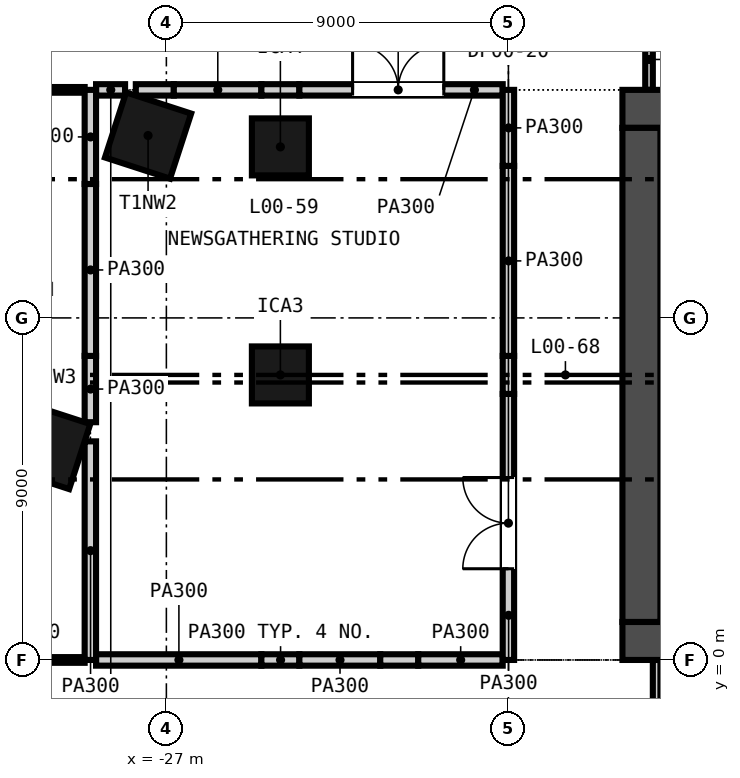
"""IFC4 building model, lengths in metres.
Left out: names, types, materials, properties, quantities, classifications, styles, units other than length and angle.
Written with IfcOpenShell. Run it as: python <this file> out.ifc"""

import sys

from ifc_helpers import new_model, si_unit, direction, frame, frame_2d, origin, origin_2d, place, context, subcontext, project, spatial, rectangle, extrude, element, fill, save


model = new_model("IFC4")
c1 = context("Model", 3, precision=1e-05, world=origin(), true_north=direction((0.0, 1.0)))
c2 = subcontext(c1, "Body", "Model", "MODEL_VIEW")
j1 = project(units=[si_unit("LENGTHUNIT", "METRE"), si_unit("PLANEANGLEUNIT", "RADIAN")], contexts=[c1])
p1 = place(None, origin())
s1 = spatial("IfcSite", under=j1, at=p1, CompositionType="ELEMENT")
p2 = place(p1, origin())
s2 = spatial("IfcBuilding", under=s1, at=p2, CompositionType="ELEMENT")
p3 = place(p2, origin())
s3 = spatial("IfcBuildingStorey", under=s2, at=p3, CompositionType="ELEMENT", Elevation=0.0)
p4 = place(p3, frame((-15.0, 0.5, -2.2), z_axis=(0.0, 0.0, 1.0), x_axis=(1.0, 0.0, 0.0)))
e1 = element("IfcWall", 1, at=p4, inside=s3, PredefinedType="SOLIDWALL", context=c2, shape_type="SweptSolid", body=[
    extrude(rectangle(XDim=30.0, YDim=1.0, at=frame_2d((15.0, 0.0))), origin(), (0.0, 0.0, 1.0), 10.8),
])
p5 = place(p4, frame((5.8, 0.0, 2.2)))
e2 = element("IfcOpeningElement", 2, at=p5, cuts=e1, PredefinedType="OPENING", context=c2, shape_type="SweptSolid", body=[
    extrude(rectangle(XDim=2.4, YDim=2.4, at=frame_2d((1.2, 1.2))), frame((0.0, 0.51, 0.0), z_axis=(0.0, -1.0, 0.0), x_axis=(1.0, 0.0, 0.0)), (0.0, 0.0, 1.0), 1.02),
])
p6 = place(p4, frame((13.8, 0.0, 2.2)))
e3 = element("IfcOpeningElement", 3, at=p6, cuts=e1, PredefinedType="OPENING", context=c2, shape_type="SweptSolid", body=[
    extrude(rectangle(XDim=2.4, YDim=2.4, at=frame_2d((1.2, 1.2))), frame((0.0, 0.51, 0.0), z_axis=(0.0, -1.0, 0.0), x_axis=(1.0, 0.0, 0.0)), (0.0, 0.0, 1.0), 1.02),
])
p7 = place(p4, frame((21.8, 0.0, 2.2)))
e4 = element("IfcOpeningElement", 4, at=p7, cuts=e1, PredefinedType="OPENING", context=c2, shape_type="SweptSolid", body=[
    extrude(rectangle(XDim=2.4, YDim=2.4, at=frame_2d((1.2, 1.2))), frame((0.0, 0.51, 0.0), z_axis=(0.0, -1.0, 0.0), x_axis=(1.0, 0.0, 0.0)), (0.0, 0.0, 1.0), 1.02),
])
p8 = place(p4, frame((1.5, 0.0, 2.2)))
e5 = element("IfcOpeningElement", 5, at=p8, cuts=e1, PredefinedType="OPENING", context=c2, shape_type="SweptSolid", body=[
    extrude(rectangle(XDim=1.2, YDim=2.1, at=frame_2d((0.6, 1.05))), frame((0.0, 0.51, 0.0), z_axis=(0.0, -1.0, 0.0), x_axis=(1.0, 0.0, 0.0)), (0.0, 0.0, 1.0), 1.02),
])
p9 = place(p4, frame((27.3, 0.0, 2.2)))
e6 = element("IfcOpeningElement", 6, at=p9, cuts=e1, PredefinedType="OPENING", context=c2, shape_type="SweptSolid", body=[
    extrude(rectangle(XDim=1.2, YDim=2.1, at=frame_2d((0.6, 1.05))), frame((0.0, 0.51, 0.0), z_axis=(0.0, -1.0, 0.0), x_axis=(1.0, 0.0, 0.0)), (0.0, 0.0, 1.0), 1.02),
])
p10 = place(p3, frame((-15.0, 14.5, -2.2), z_axis=(0.0, 0.0, 1.0), x_axis=(1.0, 0.0, 0.0)))
e7 = element("IfcWall", 7, at=p10, inside=s3, PredefinedType="SOLIDWALL", context=c2, shape_type="SweptSolid", body=[
    extrude(rectangle(XDim=30.0, YDim=1.0, at=frame_2d((15.0, 0.0))), origin(), (0.0, 0.0, 1.0), 10.8),
])
p11 = place(p10, frame((9.25, 0.0, 2.2)))
e8 = element("IfcOpeningElement", 8, at=p11, cuts=e7, PredefinedType="OPENING", context=c2, shape_type="SweptSolid", body=[
    extrude(rectangle(XDim=1.5, YDim=2.1, at=frame_2d((0.75, 1.05))), frame((0.0, 0.51, 0.0), z_axis=(0.0, -1.0, 0.0), x_axis=(1.0, 0.0, 0.0)), (0.0, 0.0, 1.0), 1.02),
])
p12 = place(p10, frame((19.4, 0.0, 2.2)))
e9 = element("IfcOpeningElement", 9, at=p12, cuts=e7, PredefinedType="OPENING", context=c2, shape_type="SweptSolid", body=[
    extrude(rectangle(XDim=1.5, YDim=2.1, at=frame_2d((0.75, 1.05))), frame((0.0, 0.51, 0.0), z_axis=(0.0, -1.0, 0.0), x_axis=(1.0, 0.0, 0.0)), (0.0, 0.0, 1.0), 1.02),
])
p13 = place(p10, frame((1.5, 0.0, 2.2)))
e10 = element("IfcOpeningElement", 10, at=p13, cuts=e7, PredefinedType="OPENING", context=c2, shape_type="SweptSolid", body=[
    extrude(rectangle(XDim=1.2, YDim=2.1, at=frame_2d((0.6, 1.05))), frame((0.0, 0.51, 0.0), z_axis=(0.0, -1.0, 0.0), x_axis=(1.0, 0.0, 0.0)), (0.0, 0.0, 1.0), 1.02),
])
p14 = place(p10, frame((27.3, 0.0, 2.2)))
e11 = element("IfcOpeningElement", 11, at=p14, cuts=e7, PredefinedType="OPENING", context=c2, shape_type="SweptSolid", body=[
    extrude(rectangle(XDim=1.2, YDim=2.1, at=frame_2d((0.6, 1.05))), frame((0.0, 0.51, 0.0), z_axis=(0.0, -1.0, 0.0), x_axis=(1.0, 0.0, 0.0)), (0.0, 0.0, 1.0), 1.02),
])
p15 = place(p3, frame((-14.5, 1.0, -2.2), z_axis=(0.0, 0.0, 1.0), x_axis=(0.0, 1.0, 0.0)))
e12 = element("IfcWall", 12, at=p15, inside=s3, PredefinedType="SOLIDWALL", context=c2, shape_type="SweptSolid", body=[
    extrude(rectangle(XDim=13.0, YDim=1.0, at=frame_2d((6.5, 0.0))), origin(), (0.0, 0.0, 1.0), 10.8),
])
for number, where, z_axis, x_axis in (
    (13, (-27.482, 13.799, -0.3), (0.0, 0.0, 1.0), (-0.309, -0.951, 0.0)),
    (14, (-30.136, 5.63, -0.3), (0.0, 0.0, 1.0), (-0.309, -0.951, 0.0)),
):
    element("IfcColumn", number, at=place(p3, frame(where, z_axis=z_axis, x_axis=x_axis)), inside=s3, PredefinedType="COLUMN", context=c2, shape_type="SweptSolid", body=[
        extrude(rectangle(XDim=1.8, YDim=1.8, at=origin_2d()), origin(), (0.0, 0.0, 1.0), 8.9),
    ])
for number, where, z_axis, x_axis in (
    (15, (-24.0, 7.5, -0.3), (0.0, 0.0, 1.0), (1.0, 0.0, 0.0)),
    (16, (-24.0, 13.5, -0.3), (0.0, 0.0, 1.0), (1.0, 0.0, 0.0)),
):
    element("IfcColumn", number, at=place(p3, frame(where, z_axis=z_axis, x_axis=x_axis)), inside=s3, PredefinedType="COLUMN", context=c2, shape_type="SweptSolid", body=[
        extrude(rectangle(XDim=1.5, YDim=1.5, at=origin_2d()), origin(), (0.0, 0.0, 1.0), 8.9),
    ])
p16 = place(p3, frame((-31.991, 0.0, 0.0), z_axis=(0.0, 0.0, 1.0), x_axis=(1.0, 0.0, 0.0)))
e17 = element("IfcWall", 17, at=p16, inside=s3, PredefinedType="PARTITIONING", context=c2, shape_type="SweptSolid", body=[
    extrude(rectangle(XDim=2.841, YDim=0.15, at=frame_2d((1.42, 0.0))), origin(), (0.0, 0.0, 1.0), 8.6),
])
p17 = place(p3, frame((-28.85, 0.0, 0.0), z_axis=(0.0, 0.0, 1.0), x_axis=(1.0, 0.0, 0.0)))
e18 = element("IfcWall", 18, at=p17, inside=s3, PredefinedType="PARTITIONING", context=c2, shape_type="SweptSolid", body=[
    extrude(rectangle(XDim=4.35, YDim=0.3, at=frame_2d((2.175, 0.0))), origin(), (0.0, 0.0, 1.0), 8.6),
])
p18 = place(p3, frame((-24.5, 0.0, 0.0), z_axis=(0.0, 0.0, 1.0), x_axis=(1.0, 0.0, 0.0)))
e19 = element("IfcWall", 19, at=p18, inside=s3, PredefinedType="PARTITIONING", context=c2, shape_type="SweptSolid", body=[
    extrude(rectangle(XDim=1.0, YDim=0.3, at=frame_2d((0.5, 0.0))), origin(), (0.0, 0.0, 1.0), 7.765),
])
p19 = place(p3, frame((-23.5, 0.0, 0.0), z_axis=(0.0, 0.0, 1.0), x_axis=(1.0, 0.0, 0.0)))
e20 = element("IfcWall", 20, at=p19, inside=s3, PredefinedType="PARTITIONING", context=c2, shape_type="SweptSolid", body=[
    extrude(rectangle(XDim=2.128, YDim=0.3, at=frame_2d((1.064, 0.0))), origin(), (0.0, 0.0, 1.0), 8.6),
])
p20 = place(p3, frame((-21.372, 0.0, 0.0), z_axis=(0.0, 0.0, 1.0), x_axis=(1.0, 0.0, 0.0)))
e21 = element("IfcWall", 21, at=p20, inside=s3, PredefinedType="PARTITIONING", context=c2, shape_type="SweptSolid", body=[
    extrude(rectangle(XDim=1.0, YDim=0.3, at=frame_2d((0.5, 0.0))), origin(), (0.0, 0.0, 1.0), 7.765),
])
p21 = place(p3, frame((-20.372, 0.0, 0.0), z_axis=(0.0, 0.0, 1.0), x_axis=(1.0, 0.0, 0.0)))
e22 = element("IfcWall", 22, at=p21, inside=s3, PredefinedType="PARTITIONING", context=c2, shape_type="SweptSolid", body=[
    extrude(rectangle(XDim=2.222, YDim=0.3, at=frame_2d((1.111, 0.0))), origin(), (0.0, 0.0, 1.0), 8.6),
])
p22 = place(p3, frame((-36.25, 15.0, 0.0), z_axis=(0.0, 0.0, 1.0), x_axis=(1.0, 0.0, 0.0)))
e23 = element("IfcWall", 23, at=p22, inside=s3, PredefinedType="PARTITIONING", context=c2, shape_type="SweptSolid", body=[
    extrude(rectangle(XDim=7.1, YDim=0.15, at=frame_2d((3.55, 0.0))), origin(), (0.0, 0.0, 1.0), 8.6),
])
p23 = place(p22, frame((3.15, 0.0, 0.0)))
e24 = element("IfcOpeningElement", 24, at=p23, cuts=e23, PredefinedType="OPENING", context=c2, shape_type="SweptSolid", body=[
    extrude(rectangle(XDim=1.0, YDim=2.1, at=frame_2d((0.5, 1.05))), frame((0.0, 0.085, 0.0), z_axis=(0.0, -1.0, 0.0), x_axis=(1.0, 0.0, 0.0)), (0.0, 0.0, 1.0), 0.17),
])
p24 = place(p3, frame((-28.85, 15.0, 0.0), z_axis=(0.0, 0.0, 1.0), x_axis=(1.0, 0.0, 0.0)))
e25 = element("IfcWall", 25, at=p24, inside=s3, PredefinedType="PARTITIONING", context=c2, shape_type="SweptSolid", body=[
    extrude(rectangle(XDim=0.764, YDim=0.3, at=frame_2d((0.382, 0.0))), origin(), (0.0, 0.0, 1.0), 8.6),
])
p25 = place(p3, frame((-27.804, 15.0, 0.0), z_axis=(0.0, 0.0, 1.0), x_axis=(1.0, 0.0, 0.0)))
e26 = element("IfcWall", 26, at=p25, inside=s3, PredefinedType="PARTITIONING", context=c2, shape_type="SweptSolid", body=[
    extrude(rectangle(XDim=1.0, YDim=0.3, at=frame_2d((0.5, 0.0))), origin(), (0.0, 0.0, 1.0), 7.6),
])
p26 = place(p3, frame((-26.804, 15.0, 0.0), z_axis=(0.0, 0.0, 1.0), x_axis=(1.0, 0.0, 0.0)))
e27 = element("IfcWall", 27, at=p26, inside=s3, PredefinedType="PARTITIONING", context=c2, shape_type="SweptSolid", body=[
    extrude(rectangle(XDim=2.304, YDim=0.3, at=frame_2d((1.152, 0.0))), origin(), (0.0, 0.0, 1.0), 8.6),
])
p27 = place(p3, frame((-24.5, 15.0, 0.0), z_axis=(0.0, 0.0, 1.0), x_axis=(1.0, 0.0, 0.0)))
e28 = element("IfcWall", 28, at=p27, inside=s3, PredefinedType="PARTITIONING", context=c2, shape_type="SweptSolid", body=[
    extrude(rectangle(XDim=1.0, YDim=0.3, at=frame_2d((0.5, 0.0))), origin(), (0.0, 0.0, 1.0), 7.997),
])
p28 = place(p3, frame((-23.5, 15.0, 0.0), z_axis=(0.0, 0.0, 1.0), x_axis=(1.0, 0.0, 0.0)))
e29 = element("IfcWall", 29, at=p28, inside=s3, PredefinedType="PARTITIONING", context=c2, shape_type="SweptSolid", body=[
    extrude(rectangle(XDim=5.35, YDim=0.3, at=frame_2d((2.675, 0.0))), origin(), (0.0, 0.0, 1.0), 8.6),
])
p29 = place(p28, frame((1.4, 0.0, 0.0)))
e30 = element("IfcOpeningElement", 30, at=p29, cuts=e29, PredefinedType="OPENING", context=c2, shape_type="SweptSolid", body=[
    extrude(rectangle(XDim=2.4, YDim=2.4, at=frame_2d((1.2, 1.2))), frame((0.0, 0.16, 0.0), z_axis=(0.0, -1.0, 0.0), x_axis=(1.0, 0.0, 0.0)), (0.0, 0.0, 1.0), 0.32),
])
p30 = place(p3, frame((-29.0, 0.0, 0.0), z_axis=(0.0, 0.0, 1.0), x_axis=(0.0, 1.0, 0.0)))
e31 = element("IfcWall", 31, at=p30, inside=s3, PredefinedType="PARTITIONING", context=c2, shape_type="SweptSolid", body=[
    extrude(rectangle(XDim=5.752, YDim=0.3, at=frame_2d((2.876, 0.0))), origin(), (0.0, 0.0, 1.0), 8.6),
])
p31 = place(p3, frame((-29.0, 6.256, 0.0), z_axis=(0.0, 0.0, 1.0), x_axis=(0.0, 1.0, 0.0)))
e32 = element("IfcWall", 32, at=p31, inside=s3, PredefinedType="PARTITIONING", context=c2, shape_type="SweptSolid", body=[
    extrude(rectangle(XDim=1.744, YDim=0.3, at=frame_2d((0.872, 0.0))), origin(), (0.0, 0.0, 1.0), 8.067),
])
p32 = place(p3, frame((-29.0, 8.0, 0.0), z_axis=(0.0, 0.0, 1.0), x_axis=(0.0, 1.0, 0.0)))
e33 = element("IfcWall", 33, at=p32, inside=s3, PredefinedType="PARTITIONING", context=c2, shape_type="SweptSolid", body=[
    extrude(rectangle(XDim=4.524, YDim=0.3, at=frame_2d((2.262, 0.0))), origin(), (0.0, 0.0, 1.0), 7.6),
])
p33 = place(p3, frame((-29.0, 12.524, 0.0), z_axis=(0.0, 0.0, 1.0), x_axis=(0.0, 1.0, 0.0)))
e34 = element("IfcWall", 34, at=p33, inside=s3, PredefinedType="PARTITIONING", context=c2, shape_type="SweptSolid", body=[
    extrude(rectangle(XDim=2.476, YDim=0.3, at=frame_2d((1.238, 0.0))), origin(), (0.0, 0.0, 1.0), 8.6),
])
p34 = place(p3, frame((-18.0, 0.0, 0.0), z_axis=(0.0, 0.0, 1.0), x_axis=(0.0, 1.0, 0.0)))
e35 = element("IfcWall", 35, at=p34, inside=s3, PredefinedType="PARTITIONING", context=c2, shape_type="SweptSolid", body=[
    extrude(rectangle(XDim=7.0, YDim=0.3, at=frame_2d((3.5, 0.0))), origin(), (0.0, 0.0, 1.0), 8.6),
])
p35 = place(p34, frame((2.4, 0.0, 0.0)))
e36 = element("IfcOpeningElement", 36, at=p35, cuts=e35, PredefinedType="OPENING", context=c2, shape_type="SweptSolid", body=[
    extrude(rectangle(XDim=2.4, YDim=2.4, at=frame_2d((1.2, 1.2))), frame((0.0, 0.16, 0.0), z_axis=(0.0, -1.0, 0.0), x_axis=(1.0, 0.0, 0.0)), (0.0, 0.0, 1.0), 0.32),
])
p36 = place(p3, frame((-18.0, 7.0, 0.0), z_axis=(0.0, 0.0, 1.0), x_axis=(0.0, 1.0, 0.0)))
e37 = element("IfcWall", 37, at=p36, inside=s3, PredefinedType="PARTITIONING", context=c2, shape_type="SweptSolid", body=[
    extrude(rectangle(XDim=1.0, YDim=0.3, at=frame_2d((0.5, 0.0))), origin(), (0.0, 0.0, 1.0), 7.994),
])
p37 = place(p3, frame((-18.0, 8.0, 0.0), z_axis=(0.0, 0.0, 1.0), x_axis=(0.0, 1.0, 0.0)))
e38 = element("IfcWall", 38, at=p37, inside=s3, PredefinedType="PARTITIONING", context=c2, shape_type="SweptSolid", body=[
    extrude(rectangle(XDim=5.0, YDim=0.3, at=frame_2d((2.5, 0.0))), origin(), (0.0, 0.0, 1.0), 8.6),
])
p38 = place(p3, frame((-18.0, 13.0, 0.0), z_axis=(0.0, 0.0, 1.0), x_axis=(0.0, 1.0, 0.0)))
e39 = element("IfcWall", 39, at=p38, inside=s3, PredefinedType="PARTITIONING", context=c2, shape_type="SweptSolid", body=[
    extrude(rectangle(XDim=2.0, YDim=0.3, at=frame_2d((1.0, 0.0))), origin(), (0.0, 0.0, 1.0), 7.994),
])
p39 = place(p3, frame((-14.3, 15.0, 0.0), z_axis=(0.0, 0.0, 1.0), x_axis=(0.0, 1.0, 0.0)))
e40 = element("IfcWall", 40, at=p39, inside=s3, PredefinedType="PARTITIONING", context=c2, shape_type="SweptSolid", body=[
    extrude(rectangle(XDim=1.6, YDim=0.2, at=frame_2d((0.8, 0.0))), origin(), (0.0, 0.0, 1.0), 8.6),
])
p40 = place(p3, frame((-14.1, -9.4, 0.0), z_axis=(0.0, 0.0, 1.0), x_axis=(0.0, 1.0, 0.0)))
e41 = element("IfcWall", 41, at=p40, inside=s3, PredefinedType="PARTITIONING", context=c2, shape_type="SweptSolid", body=[
    extrude(rectangle(XDim=9.4, YDim=0.2, at=frame_2d((4.7, 0.0))), origin(), (0.0, 0.0, 1.0), 8.6),
])
p41 = place(p35, origin())
e42 = element("IfcDoor", 42, at=p41, inside=s3, OperationType="SINGLE_SWING_LEFT", PredefinedType="DOOR", context=c2, shape_type="SweptSolid", body=[
    extrude(rectangle(XDim=2.4, YDim=2.4, at=frame_2d((1.2, 1.2))), frame((0.0, 0.025, 0.0), z_axis=(0.0, -1.0, 0.0), x_axis=(1.0, 0.0, 0.0)), (0.0, 0.0, 1.0), 0.05),
])
fill(e36, e42)
p42 = place(p29, origin())
e43 = element("IfcDoor", 43, at=p42, inside=s3, OperationType="SINGLE_SWING_LEFT", PredefinedType="DOOR", context=c2, shape_type="SweptSolid", body=[
    extrude(rectangle(XDim=2.4, YDim=2.4, at=frame_2d((1.2, 1.2))), frame((0.0, 0.025, 0.0), z_axis=(0.0, -1.0, 0.0), x_axis=(1.0, 0.0, 0.0)), (0.0, 0.0, 1.0), 0.05),
])
fill(e30, e43)
save(model, sys.argv[1])
